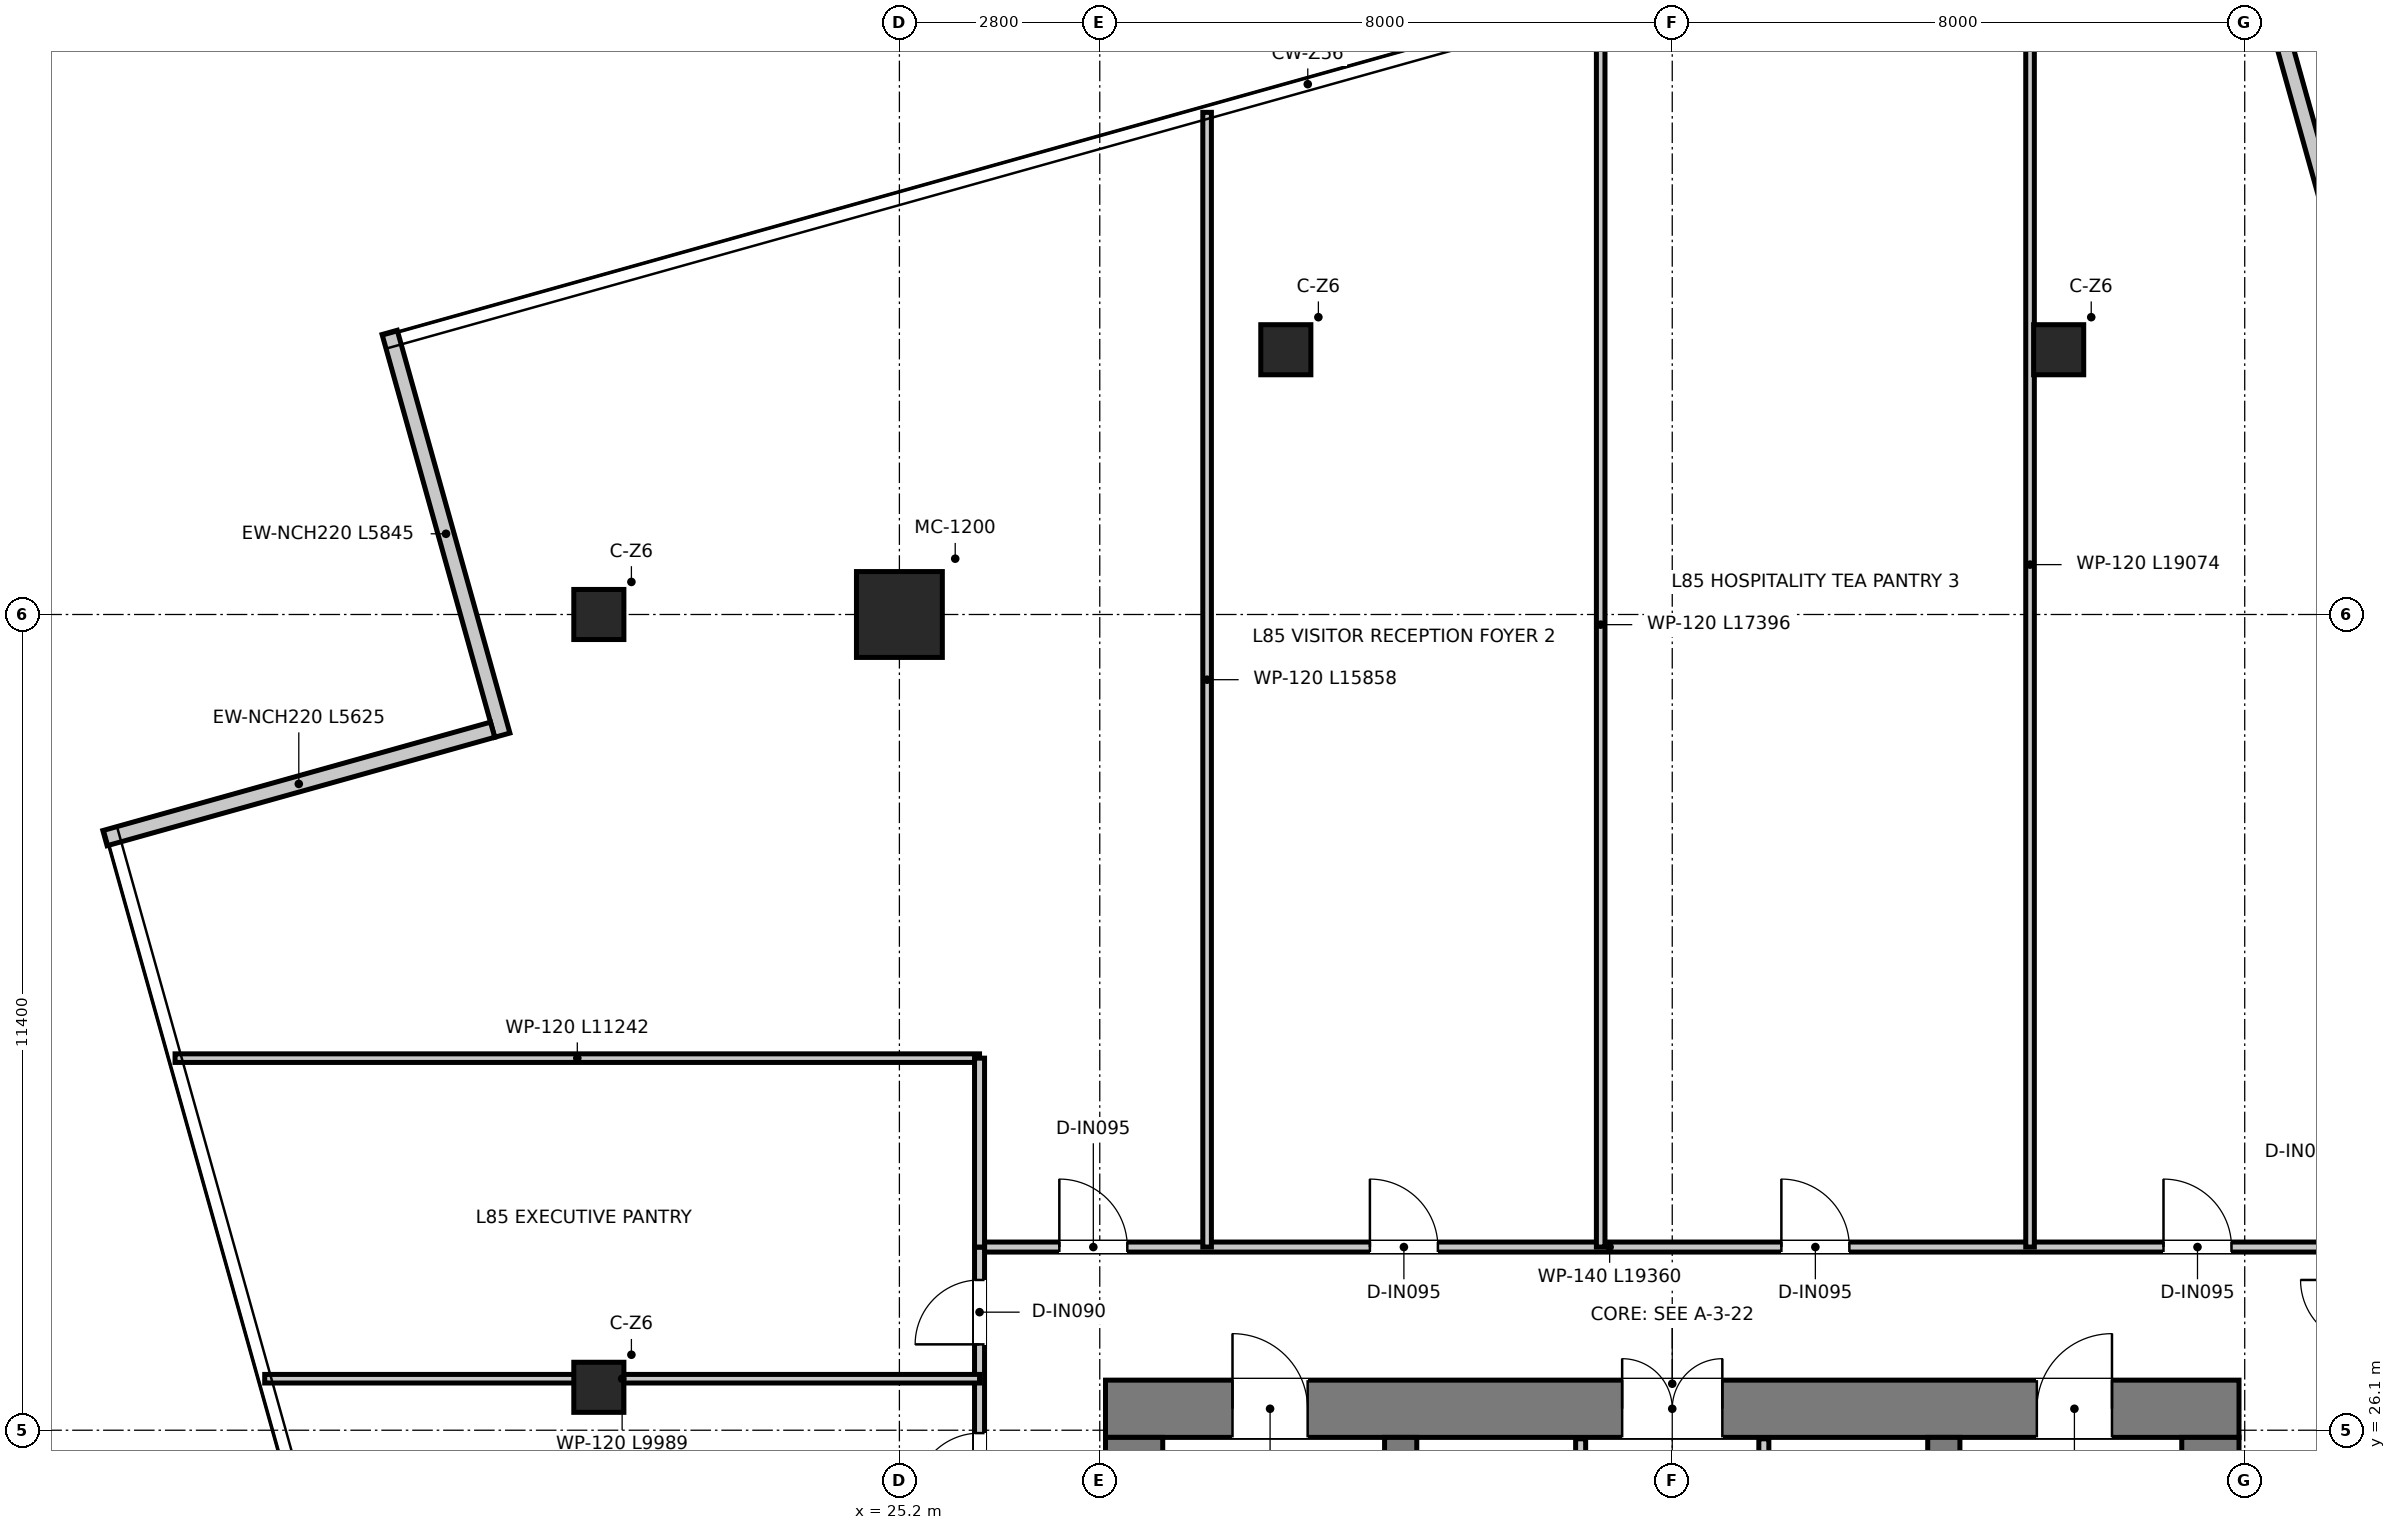
"""IFC4 building model, lengths in metres.
Left out: names, types, materials, properties, quantities, classifications, styles, units other than length and angle.
Written with IfcOpenShell. Run it as: python <this file> out.ifc"""

import sys

from ifc_helpers import new_model, si_unit, direction, frame, frame_2d, origin, origin_2d, place, context, subcontext, project, spatial, rectangle, extrude, source, transform, mapped, element, fill, save


model = new_model("IFC4")
c1 = context("Model", 3, precision=1e-05, world=origin(), true_north=direction((0.0, 1.0)))
c2 = subcontext(c1, "Body", "Model", "MODEL_VIEW")
j1 = project(units=[si_unit("LENGTHUNIT", "METRE"), si_unit("PLANEANGLEUNIT", "RADIAN")], contexts=[c1])
p1 = place(None, origin())
s1 = spatial("IfcSite", under=j1, at=p1, CompositionType="ELEMENT")
p2 = place(p1, origin())
s2 = spatial("IfcBuilding", under=s1, at=p2, CompositionType="ELEMENT")
p3 = place(p2, frame((0.0, 0.0, 347.45)))
s3 = spatial("IfcBuildingStorey", under=s2, at=p3, CompositionType="ELEMENT", Elevation=347.45)
p4 = place(p3, frame((28.08, 26.4, 0.0), z_axis=(0.0, 0.0, 1.0), x_axis=(1.0, 0.0, 0.0)))
e1 = element("IfcWall", 1, at=p4, inside=s3, PredefinedType="SHEAR", context=c2, shape_type="SweptSolid", body=[
    extrude(rectangle(XDim=15.84, YDim=0.8, at=frame_2d((7.92, 0.0))), origin(), (0.0, 0.0, 1.0), 3.95),
])
p5 = place(p4, frame((7.22, 0.0, 0.0)))
e2 = element("IfcOpeningElement", 2, at=p5, cuts=e1, PredefinedType="OPENING", context=c2, shape_type="SweptSolid", body=[
    extrude(rectangle(XDim=1.4, YDim=2.2, at=frame_2d((0.7, 1.1))), frame((0.0, 0.41, 0.0), z_axis=(0.0, -1.0, 0.0), x_axis=(1.0, 0.0, 0.0)), (0.0, 0.0, 1.0), 0.82),
])
p6 = place(p4, frame((1.775, 0.0, 0.0)))
e3 = element("IfcOpeningElement", 3, at=p6, cuts=e1, PredefinedType="OPENING", context=c2, shape_type="SweptSolid", body=[
    extrude(rectangle(XDim=1.05, YDim=2.1, at=frame_2d((0.525, 1.05))), frame((0.0, 0.41, 0.0), z_axis=(0.0, -1.0, 0.0), x_axis=(1.0, 0.0, 0.0)), (0.0, 0.0, 1.0), 0.82),
])
p7 = place(p4, frame((13.015, 0.0, 0.0)))
e4 = element("IfcOpeningElement", 4, at=p7, cuts=e1, PredefinedType="OPENING", context=c2, shape_type="SweptSolid", body=[
    extrude(rectangle(XDim=1.05, YDim=2.1, at=frame_2d((0.525, 1.05))), frame((0.0, 0.41, 0.0), z_axis=(0.0, -1.0, 0.0), x_axis=(1.0, 0.0, 0.0)), (0.0, 0.0, 1.0), 0.82),
])
for number, where, z_axis, x_axis in (
    (5, (28.48, 11.3, 0.0), (0.0, 0.0, 1.0), (0.0, 1.0, 0.0)),
    (6, (43.52, 11.3, 0.0), (0.0, 0.0, 1.0), (0.0, 1.0, 0.0)),
):
    element("IfcWall", number, at=place(p3, frame(where, z_axis=z_axis, x_axis=x_axis)), inside=s3, PredefinedType="SHEAR", context=c2, shape_type="SweptSolid", body=[
        extrude(rectangle(XDim=14.7, YDim=0.8, at=frame_2d((7.35, 0.0))), origin(), (0.0, 0.0, 1.0), 3.95),
    ])
p8 = place(p3, frame((32.205, 13.22, 0.0), z_axis=(0.0, 0.0, 1.0), x_axis=(0.0, 1.0, 0.0)))
e7 = element("IfcWall", 7, at=p8, inside=s3, PredefinedType="SHEAR", context=c2, shape_type="SweptSolid", body=[
    extrude(rectangle(XDim=12.78, YDim=0.45, at=frame_2d((6.39, 0.0))), origin(), (0.0, 0.0, 1.0), 3.95),
])
p9 = place(p8, frame((10.58, 0.0, 0.0)))
e8 = element("IfcOpeningElement", 8, at=p9, cuts=e7, PredefinedType="OPENING", context=c2, shape_type="SweptSolid", body=[
    extrude(rectangle(XDim=1.1, YDim=2.15, at=frame_2d((0.55, 1.075))), frame((0.0, 0.235, 0.0), z_axis=(0.0, -1.0, 0.0), x_axis=(1.0, 0.0, 0.0)), (0.0, 0.0, 1.0), 0.47),
])
p10 = place(p3, frame((39.795, 13.22, 0.0), z_axis=(0.0, 0.0, 1.0), x_axis=(0.0, 1.0, 0.0)))
e9 = element("IfcWall", 9, at=p10, inside=s3, PredefinedType="SHEAR", context=c2, shape_type="SweptSolid", body=[
    extrude(rectangle(XDim=12.78, YDim=0.45, at=frame_2d((6.39, 0.0))), origin(), (0.0, 0.0, 1.0), 3.95),
])
p11 = place(p10, frame((10.58, 0.0, 0.0)))
e10 = element("IfcOpeningElement", 10, at=p11, cuts=e9, PredefinedType="OPENING", context=c2, shape_type="SweptSolid", body=[
    extrude(rectangle(XDim=1.1, YDim=2.15, at=frame_2d((0.55, 1.075))), frame((0.0, 0.235, 0.0), z_axis=(0.0, -1.0, 0.0), x_axis=(1.0, 0.0, 0.0)), (0.0, 0.0, 1.0), 0.47),
])
m1 = source(origin(), c2, "Body", "SweptSolid", [
    extrude(rectangle(XDim=1.2, YDim=1.2, at=origin_2d()), origin(), (0.0, 0.0, 1.0), 3.95),
])
p12 = place(p3, frame((25.2, 37.5, 0.0), z_axis=(0.0, 0.0, 1.0), x_axis=(1.0, 0.0, 0.0)))
e11 = element("IfcColumn", 11, at=p12, inside=s3, PredefinedType="USERDEFINED", context=c2, shape_type="MappedRepresentation", body=[
    mapped(m1, transform((0.0, 0.0, 0.0), x_axis=(1.0, 0.0, 0.0), y_axis=(0.0, 1.0, 0.0), z_axis=(0.0, 0.0, 1.0), scale=1.0)),
])
m2 = source(origin(), c2, "Body", "SweptSolid", [
    extrude(rectangle(XDim=0.7, YDim=0.7, at=origin_2d()), origin(), (0.0, 0.0, 1.0), 3.95),
])
for number, where, z_axis, x_axis in (
    (12, (21.0, 26.7, 0.0), (0.0, 0.0, 1.0), (1.0, 0.0, 0.0)),
    (13, (21.0, 37.5, 0.0), (0.0, 0.0, 1.0), (1.0, 0.0, 0.0)),
    (14, (30.6, 41.2, 0.0), (0.0, 0.0, 1.0), (1.0, 0.0, 0.0)),
    (15, (41.4, 41.2, 0.0), (0.0, 0.0, 1.0), (1.0, 0.0, 0.0)),
):
    element("IfcColumn", number, at=place(p3, frame(where, z_axis=z_axis, x_axis=x_axis)), inside=s3, PredefinedType="COLUMN", context=c2, shape_type="MappedRepresentation", body=[
        mapped(m2, transform((0.0, 0.0, 0.0), x_axis=(1.0, 0.0, 0.0), y_axis=(0.0, 1.0, 0.0), z_axis=(0.0, 0.0, 1.0), scale=1.0)),
    ])
p13 = place(p3, frame((45.19, 43.184, 0.0), z_axis=(0.0, 0.0, 1.0), x_axis=(-0.269351408795, 0.963041960965, 0.0)))
e16 = element("IfcWall", 16, at=p13, inside=s3, PredefinedType="ELEMENTEDWALL", context=c2, shape_type="SweptSolid", body=[
    extrude(rectangle(XDim=5.625, YDim=0.22, at=frame_2d((2.812, 0.0))), origin(), (0.0, 0.0, 1.0), 3.67),
])
p14 = place(p3, frame((18.077, 41.442, 0.0), z_axis=(0.0, 0.0, 1.0), x_axis=(0.269332441418, -0.963047265714, 0.0)))
e17 = element("IfcWall", 17, at=p14, inside=s3, PredefinedType="ELEMENTEDWALL", context=c2, shape_type="SweptSolid", body=[
    extrude(rectangle(XDim=5.845, YDim=0.22, at=frame_2d((2.922, 0.0))), origin(), (0.0, 0.0, 1.0), 3.67),
])
p15 = place(p3, frame((19.516, 35.89, 0.0), z_axis=(0.0, 0.0, 1.0), x_axis=(-0.963050070433, -0.269322412432, 0.0)))
e18 = element("IfcWall", 18, at=p15, inside=s3, PredefinedType="ELEMENTEDWALL", context=c2, shape_type="SweptSolid", body=[
    extrude(rectangle(XDim=5.625, YDim=0.22, at=frame_2d((2.812, 0.0))), origin(), (0.0, 0.0, 1.0), 3.67),
])
p16 = place(p3, frame((34.72, 20.2, 0.0), z_axis=(0.0, 0.0, 1.0), x_axis=(0.0, 1.0, 0.0)))
e19 = element("IfcWall", 19, at=p16, inside=s3, PredefinedType="PARTITIONING", context=c2, shape_type="SweptSolid", body=[
    extrude(rectangle(XDim=5.78, YDim=0.14, at=frame_2d((2.89, 0.0))), origin(), (0.0, 0.0, 1.0), 2.82),
])
p17 = place(p16, frame((1.05, 0.0, 0.0)))
e20 = element("IfcOpeningElement", 20, at=p17, cuts=e19, PredefinedType="OPENING", context=c2, shape_type="SweptSolid", body=[
    extrude(rectangle(XDim=0.9, YDim=2.1, at=frame_2d((0.45, 1.05))), frame((0.0, 0.08, 0.0), z_axis=(0.0, -1.0, 0.0), x_axis=(1.0, 0.0, 0.0)), (0.0, 0.0, 1.0), 0.16),
])
p18 = place(p3, frame((37.28, 20.2, 0.0), z_axis=(0.0, 0.0, 1.0), x_axis=(0.0, 1.0, 0.0)))
e21 = element("IfcWall", 21, at=p18, inside=s3, PredefinedType="PARTITIONING", context=c2, shape_type="SweptSolid", body=[
    extrude(rectangle(XDim=5.78, YDim=0.14, at=frame_2d((2.89, 0.0))), origin(), (0.0, 0.0, 1.0), 2.82),
])
p19 = place(p18, frame((0.95, 0.0, 0.0)))
e22 = element("IfcOpeningElement", 22, at=p19, cuts=e21, PredefinedType="OPENING", context=c2, shape_type="SweptSolid", body=[
    extrude(rectangle(XDim=1.1, YDim=2.15, at=frame_2d((0.55, 1.075))), frame((0.0, 0.08, 0.0), z_axis=(0.0, -1.0, 0.0), x_axis=(1.0, 0.0, 0.0)), (0.0, 0.0, 1.0), 0.16),
])
p20 = place(p3, frame((26.32, 28.66, 0.0), z_axis=(0.0, 0.0, 1.0), x_axis=(1.0, 0.0, 0.0)))
e23 = element("IfcWall", 23, at=p20, inside=s3, PredefinedType="PARTITIONING", context=c2, shape_type="SweptSolid", body=[
    extrude(rectangle(XDim=19.36, YDim=0.14, at=frame_2d((9.68, 0.0))), origin(), (0.0, 0.0, 1.0), 3.18),
])
p21 = place(p20, frame((1.115, 0.0, 0.0)))
e24 = element("IfcOpeningElement", 24, at=p21, cuts=e23, PredefinedType="OPENING", context=c2, shape_type="SweptSolid", body=[
    extrude(rectangle(XDim=0.95, YDim=2.1, at=frame_2d((0.475, 1.05))), frame((0.0, 0.08, 0.0), z_axis=(0.0, -1.0, 0.0), x_axis=(1.0, 0.0, 0.0)), (0.0, 0.0, 1.0), 0.16),
])
p22 = place(p20, frame((5.455, 0.0, 0.0)))
e25 = element("IfcOpeningElement", 25, at=p22, cuts=e23, PredefinedType="OPENING", context=c2, shape_type="SweptSolid", body=[
    extrude(rectangle(XDim=0.95, YDim=2.1, at=frame_2d((0.475, 1.05))), frame((0.0, 0.08, 0.0), z_axis=(0.0, -1.0, 0.0), x_axis=(1.0, 0.0, 0.0)), (0.0, 0.0, 1.0), 0.16),
])
p23 = place(p20, frame((11.205, 0.0, 0.0)))
e26 = element("IfcOpeningElement", 26, at=p23, cuts=e23, PredefinedType="OPENING", context=c2, shape_type="SweptSolid", body=[
    extrude(rectangle(XDim=0.95, YDim=2.1, at=frame_2d((0.475, 1.05))), frame((0.0, 0.08, 0.0), z_axis=(0.0, -1.0, 0.0), x_axis=(1.0, 0.0, 0.0)), (0.0, 0.0, 1.0), 0.16),
])
p24 = place(p20, frame((16.545, 0.0, 0.0)))
e27 = element("IfcOpeningElement", 27, at=p24, cuts=e23, PredefinedType="OPENING", context=c2, shape_type="SweptSolid", body=[
    extrude(rectangle(XDim=0.95, YDim=2.1, at=frame_2d((0.475, 1.05))), frame((0.0, 0.08, 0.0), z_axis=(0.0, -1.0, 0.0), x_axis=(1.0, 0.0, 0.0)), (0.0, 0.0, 1.0), 0.16),
])
p25 = place(p3, frame((26.32, 13.0, 0.0), z_axis=(0.0, 0.0, 1.0), x_axis=(0.0, 1.0, 0.0)))
e28 = element("IfcWall", 28, at=p25, inside=s3, PredefinedType="PARTITIONING", context=c2, shape_type="SweptSolid", body=[
    extrude(rectangle(XDim=15.66, YDim=0.14, at=frame_2d((7.83, 0.0))), origin(), (0.0, 0.0, 1.0), 3.13),
])
p26 = place(p25, frame((14.3, 0.0, 0.0)))
e29 = element("IfcOpeningElement", 29, at=p26, cuts=e28, PredefinedType="OPENING", context=c2, shape_type="SweptSolid", body=[
    extrude(rectangle(XDim=0.9, YDim=2.1, at=frame_2d((0.45, 1.05))), frame((0.0, 0.08, 0.0), z_axis=(0.0, -1.0, 0.0), x_axis=(1.0, 0.0, 0.0)), (0.0, 0.0, 1.0), 0.16),
])
p27 = place(p25, frame((5.3, 0.0, 0.0)))
e30 = element("IfcOpeningElement", 30, at=p27, cuts=e28, PredefinedType="OPENING", context=c2, shape_type="SweptSolid", body=[
    extrude(rectangle(XDim=0.9, YDim=2.1, at=frame_2d((0.45, 1.05))), frame((0.0, 0.08, 0.0), z_axis=(0.0, -1.0, 0.0), x_axis=(1.0, 0.0, 0.0)), (0.0, 0.0, 1.0), 0.16),
])
p28 = place(p25, frame((8.75, 0.0, 0.0)))
e31 = element("IfcOpeningElement", 31, at=p28, cuts=e28, PredefinedType="OPENING", context=c2, shape_type="SweptSolid", body=[
    extrude(rectangle(XDim=0.9, YDim=2.1, at=frame_2d((0.45, 1.05))), frame((0.0, 0.08, 0.0), z_axis=(0.0, -1.0, 0.0), x_axis=(1.0, 0.0, 0.0)), (0.0, 0.0, 1.0), 0.16),
])
p29 = place(p25, frame((12.16, 0.0, 0.0)))
e32 = element("IfcOpeningElement", 32, at=p29, cuts=e28, PredefinedType="OPENING", context=c2, shape_type="SweptSolid", body=[
    extrude(rectangle(XDim=0.9, YDim=2.1, at=frame_2d((0.45, 1.05))), frame((0.0, 0.08, 0.0), z_axis=(0.0, -1.0, 0.0), x_axis=(1.0, 0.0, 0.0)), (0.0, 0.0, 1.0), 0.16),
])
p30 = place(p3, frame((16.331, 26.82, 0.0), z_axis=(0.0, 0.0, 1.0), x_axis=(1.0, 0.0, 0.0)))
e33 = element("IfcWall", 33, at=p30, inside=s3, PredefinedType="PARTITIONING", context=c2, shape_type="SweptSolid", body=[
    extrude(rectangle(XDim=9.989, YDim=0.12, at=frame_2d((4.995, 0.0))), origin(), (0.0, 0.0, 1.0), 3.13),
])
p31 = place(p3, frame((15.078, 31.3, 0.0), z_axis=(0.0, 0.0, 1.0), x_axis=(1.0, 0.0, 0.0)))
e34 = element("IfcWall", 34, at=p31, inside=s3, PredefinedType="PARTITIONING", context=c2, shape_type="SweptSolid", body=[
    extrude(rectangle(XDim=11.242, YDim=0.12, at=frame_2d((5.621, 0.0))), origin(), (0.0, 0.0, 1.0), 3.13),
])
p32 = place(p3, frame((26.32, 28.66, 0.0), z_axis=(0.0, 0.0, 1.0), x_axis=(0.0, 1.0, 0.0)))
e35 = element("IfcWall", 35, at=p32, inside=s3, PredefinedType="PARTITIONING", context=c2, shape_type="SweptSolid", body=[
    extrude(rectangle(XDim=2.64, YDim=0.14, at=frame_2d((1.32, 0.0))), origin(), (0.0, 0.0, 1.0), 3.43),
])
p33 = place(p3, frame((29.5, 28.66, 0.0), z_axis=(0.0, 0.0, 1.0), x_axis=(0.0, 1.0, 0.0)))
e36 = element("IfcWall", 36, at=p33, inside=s3, PredefinedType="PARTITIONING", context=c2, shape_type="SweptSolid", body=[
    extrude(rectangle(XDim=15.858, YDim=0.12, at=frame_2d((7.929, 0.0))), origin(), (0.0, 0.0, 1.0), 3.13),
])
p34 = place(p3, frame((35.0, 28.66, 0.0), z_axis=(0.0, 0.0, 1.0), x_axis=(0.0, 1.0, 0.0)))
e37 = element("IfcWall", 37, at=p34, inside=s3, PredefinedType="PARTITIONING", context=c2, shape_type="SweptSolid", body=[
    extrude(rectangle(XDim=17.396, YDim=0.12, at=frame_2d((8.698, 0.0))), origin(), (0.0, 0.0, 1.0), 3.13),
])
p35 = place(p3, frame((41.0, 28.66, 0.0), z_axis=(0.0, 0.0, 1.0), x_axis=(0.0, 1.0, 0.0)))
e38 = element("IfcWall", 38, at=p35, inside=s3, PredefinedType="PARTITIONING", context=c2, shape_type="SweptSolid", body=[
    extrude(rectangle(XDim=19.074, YDim=0.12, at=frame_2d((9.537, 0.0))), origin(), (0.0, 0.0, 1.0), 3.13),
])
p36 = place(p5, origin())
e39 = element("IfcDoor", 39, at=p36, inside=s3, OperationType="DOUBLE_DOOR_SINGLE_SWING", PredefinedType="DOOR", context=c2, shape_type="SweptSolid", body=[
    extrude(rectangle(XDim=1.4, YDim=2.2, at=frame_2d((0.7, 1.1))), frame((0.0, 0.025, 0.0), z_axis=(0.0, -1.0, 0.0), x_axis=(1.0, 0.0, 0.0)), (0.0, 0.0, 1.0), 0.05),
])
fill(e2, e39)
p37 = place(p6, origin())
e40 = element("IfcDoor", 40, at=p37, inside=s3, OperationType="SINGLE_SWING_LEFT", PredefinedType="DOOR", context=c2, shape_type="SweptSolid", body=[
    extrude(rectangle(XDim=1.05, YDim=2.1, at=frame_2d((0.525, 1.05))), frame((0.0, 0.025, 0.0), z_axis=(0.0, -1.0, 0.0), x_axis=(1.0, 0.0, 0.0)), (0.0, 0.0, 1.0), 0.05),
])
fill(e3, e40)
p38 = place(p7, origin())
e41 = element("IfcDoor", 41, at=p38, inside=s3, OperationType="SINGLE_SWING_RIGHT", PredefinedType="DOOR", context=c2, shape_type="SweptSolid", body=[
    extrude(rectangle(XDim=1.05, YDim=2.1, at=frame_2d((0.525, 1.05))), frame((0.0, 0.025, 0.0), z_axis=(0.0, -1.0, 0.0), x_axis=(1.0, 0.0, 0.0)), (0.0, 0.0, 1.0), 0.05),
])
fill(e4, e41)
p39 = place(p26, origin())
e42 = element("IfcDoor", 42, at=p39, inside=s3, OperationType="SINGLE_SWING_LEFT", PredefinedType="DOOR", context=c2, shape_type="SweptSolid", body=[
    extrude(rectangle(XDim=0.9, YDim=2.1, at=frame_2d((0.45, 1.05))), frame((0.0, 0.025, 0.0), z_axis=(0.0, -1.0, 0.0), x_axis=(1.0, 0.0, 0.0)), (0.0, 0.0, 1.0), 0.05),
])
fill(e29, e42)
p40 = place(p21, origin())
e43 = element("IfcDoor", 43, at=p40, inside=s3, OperationType="SINGLE_SWING_LEFT", PredefinedType="DOOR", context=c2, shape_type="SweptSolid", body=[
    extrude(rectangle(XDim=0.95, YDim=2.1, at=frame_2d((0.475, 1.05))), frame((0.0, 0.025, 0.0), z_axis=(0.0, -1.0, 0.0), x_axis=(1.0, 0.0, 0.0)), (0.0, 0.0, 1.0), 0.05),
])
fill(e24, e43)
p41 = place(p22, origin())
e44 = element("IfcDoor", 44, at=p41, inside=s3, OperationType="SINGLE_SWING_LEFT", PredefinedType="DOOR", context=c2, shape_type="SweptSolid", body=[
    extrude(rectangle(XDim=0.95, YDim=2.1, at=frame_2d((0.475, 1.05))), frame((0.0, 0.025, 0.0), z_axis=(0.0, -1.0, 0.0), x_axis=(1.0, 0.0, 0.0)), (0.0, 0.0, 1.0), 0.05),
])
fill(e25, e44)
p42 = place(p23, origin())
e45 = element("IfcDoor", 45, at=p42, inside=s3, OperationType="SINGLE_SWING_LEFT", PredefinedType="DOOR", context=c2, shape_type="SweptSolid", body=[
    extrude(rectangle(XDim=0.95, YDim=2.1, at=frame_2d((0.475, 1.05))), frame((0.0, 0.025, 0.0), z_axis=(0.0, -1.0, 0.0), x_axis=(1.0, 0.0, 0.0)), (0.0, 0.0, 1.0), 0.05),
])
fill(e26, e45)
p43 = place(p24, origin())
e46 = element("IfcDoor", 46, at=p43, inside=s3, OperationType="SINGLE_SWING_LEFT", PredefinedType="DOOR", context=c2, shape_type="SweptSolid", body=[
    extrude(rectangle(XDim=0.95, YDim=2.1, at=frame_2d((0.475, 1.05))), frame((0.0, 0.025, 0.0), z_axis=(0.0, -1.0, 0.0), x_axis=(1.0, 0.0, 0.0)), (0.0, 0.0, 1.0), 0.05),
])
fill(e27, e46)
p44 = place(p29, origin())
e47 = element("IfcDoor", 47, at=p44, inside=s3, OperationType="SINGLE_SWING_LEFT", PredefinedType="DOOR", context=c2, shape_type="SweptSolid", body=[
    extrude(rectangle(XDim=0.9, YDim=2.1, at=frame_2d((0.45, 1.05))), frame((0.0, 0.025, 0.0), z_axis=(0.0, -1.0, 0.0), x_axis=(1.0, 0.0, 0.0)), (0.0, 0.0, 1.0), 0.05),
])
fill(e32, e47)
save(model, sys.argv[1])
